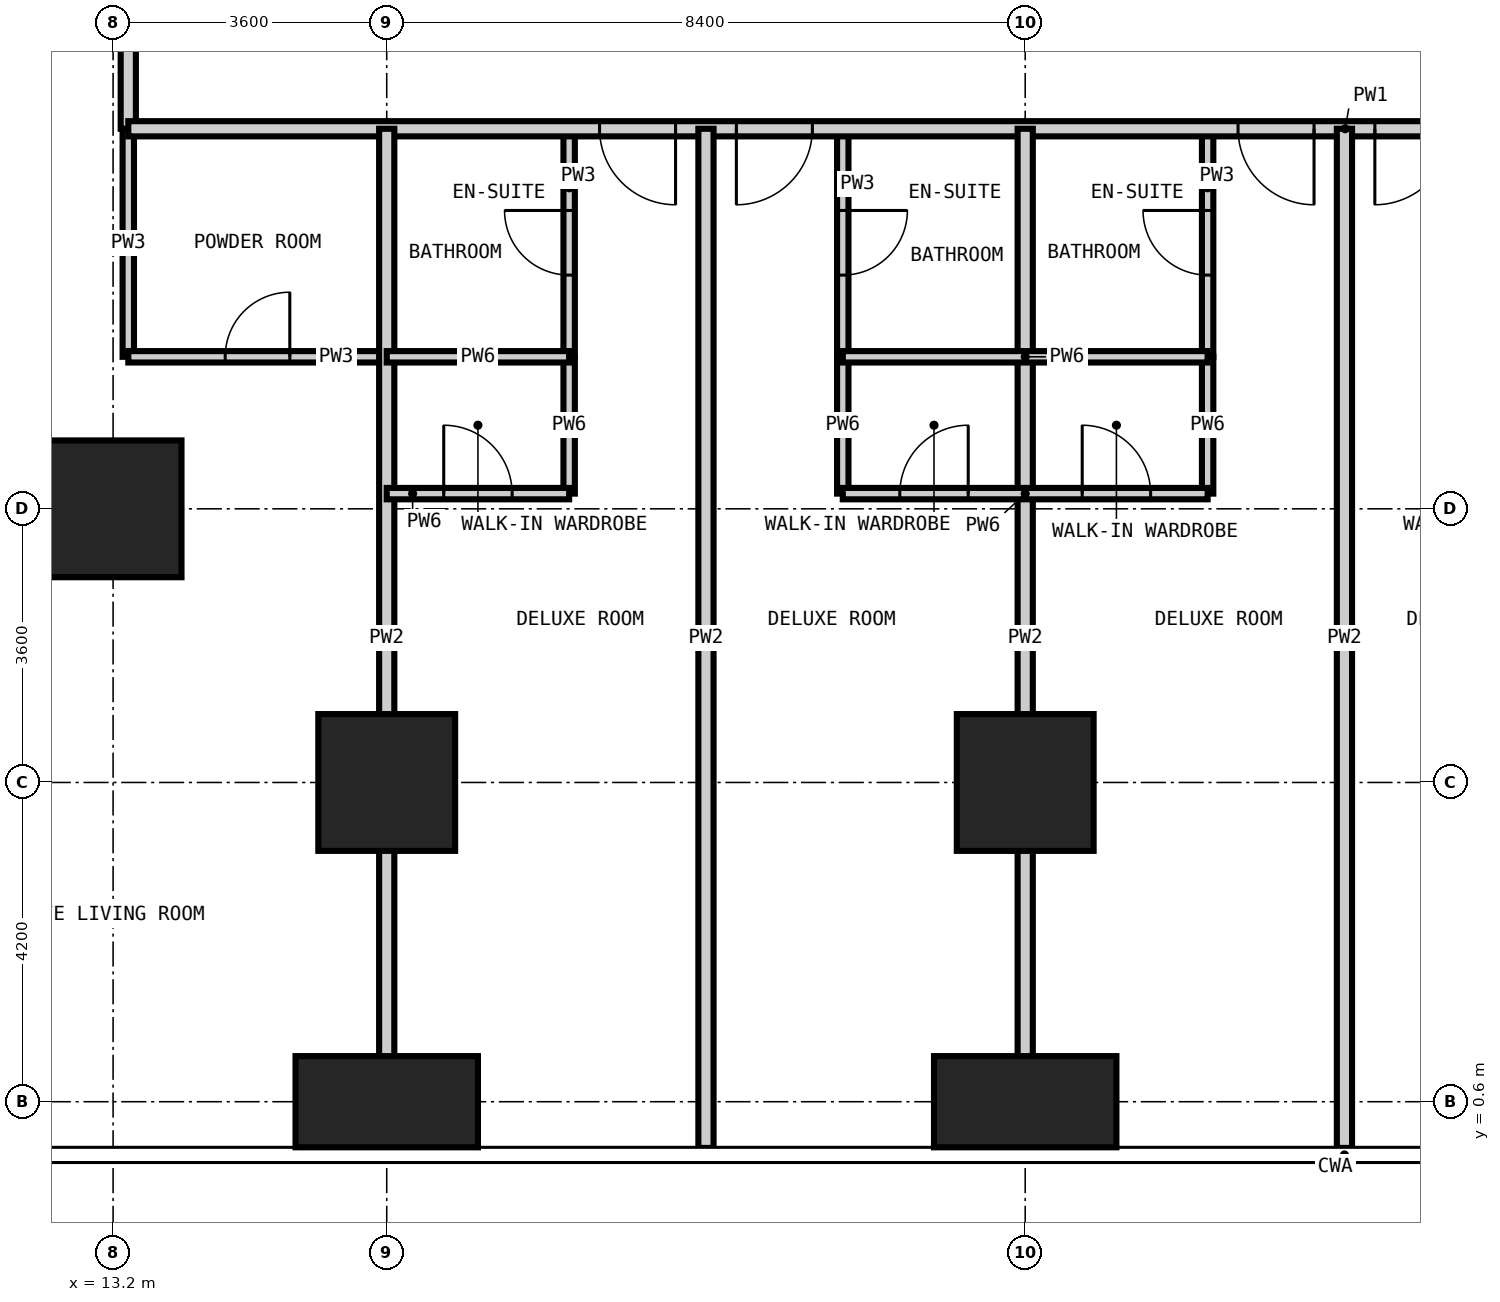
"""IFC4 building model, lengths in metres.
Left out: names, types, materials, properties, quantities, classifications, styles, units other than length and angle.
Written with IfcOpenShell. Run it as: python <this file> out.ifc"""

import sys

from ifc_helpers import new_model, si_unit, direction, frame, frame_2d, origin, origin_2d, place, context, subcontext, project, spatial, rectangle, extrude, element, fill, save


model = new_model("IFC4")
c1 = context("Model", 3, precision=1e-05, world=origin(), true_north=direction((0.0, 1.0)))
c2 = subcontext(c1, "Body", "Model", "MODEL_VIEW")
j1 = project(units=[si_unit("LENGTHUNIT", "METRE"), si_unit("PLANEANGLEUNIT", "RADIAN")], contexts=[c1])
p1 = place(None, origin())
s1 = spatial("IfcSite", under=j1, at=p1, CompositionType="ELEMENT")
p2 = place(p1, origin())
s2 = spatial("IfcBuilding", under=s1, at=p2, CompositionType="ELEMENT")
p3 = place(p2, frame((0.0, 0.0, 27.0)))
s3 = spatial("IfcBuildingStorey", under=s2, at=p3, CompositionType="ELEMENT", Elevation=27.0)
p4 = place(p3, frame((13.2, 8.4, -0.35), z_axis=(0.0, 0.0, 1.0), x_axis=(1.0, 0.0, 0.0)))
e1 = element("IfcColumn", 1, at=p4, inside=s3, PredefinedType="COLUMN", context=c2, shape_type="SweptSolid", body=[
    extrude(rectangle(XDim=1.8, YDim=1.8, at=origin_2d()), origin(), (0.0, 0.0, 1.0), 3.6),
])
p5 = place(p3, frame((16.8, 0.6, -0.35), z_axis=(0.0, 0.0, 1.0), x_axis=(1.0, 0.0, 0.0)))
e2 = element("IfcColumn", 2, at=p5, inside=s3, PredefinedType="COLUMN", context=c2, shape_type="SweptSolid", body=[
    extrude(rectangle(XDim=2.4, YDim=1.2, at=origin_2d()), origin(), (0.0, 0.0, 1.0), 3.6),
])
p6 = place(p3, frame((16.8, 4.8, -0.35), z_axis=(0.0, 0.0, 1.0), x_axis=(1.0, 0.0, 0.0)))
e3 = element("IfcColumn", 3, at=p6, inside=s3, PredefinedType="COLUMN", context=c2, shape_type="SweptSolid", body=[
    extrude(rectangle(XDim=1.8, YDim=1.8, at=origin_2d()), origin(), (0.0, 0.0, 1.0), 3.6),
])
p7 = place(p3, frame((25.2, 0.6, -0.35), z_axis=(0.0, 0.0, 1.0), x_axis=(1.0, 0.0, 0.0)))
e4 = element("IfcColumn", 4, at=p7, inside=s3, PredefinedType="COLUMN", context=c2, shape_type="SweptSolid", body=[
    extrude(rectangle(XDim=2.4, YDim=1.2, at=origin_2d()), origin(), (0.0, 0.0, 1.0), 3.6),
])
p8 = place(p3, frame((25.2, 4.8, -0.35), z_axis=(0.0, 0.0, 1.0), x_axis=(1.0, 0.0, 0.0)))
e5 = element("IfcColumn", 5, at=p8, inside=s3, PredefinedType="COLUMN", context=c2, shape_type="SweptSolid", body=[
    extrude(rectangle(XDim=1.8, YDim=1.8, at=origin_2d()), origin(), (0.0, 0.0, 1.0), 3.6),
])
p9 = place(p3, frame((13.4, 10.4, 0.0), z_axis=(0.0, 0.0, 1.0), x_axis=(0.0, 1.0, 0.0)))
e6 = element("IfcWall", 6, at=p9, inside=s3, PredefinedType="PARTITIONING", context=c2, shape_type="SweptSolid", body=[
    extrude(rectangle(XDim=3.0, YDim=0.15, at=frame_2d((1.5, 0.0))), origin(), (0.0, 0.0, 1.0), 3.25),
])
p10 = place(p3, frame((19.2, 10.4, 0.0), z_axis=(0.0, 0.0, 1.0), x_axis=(0.0, 1.0, 0.0)))
e7 = element("IfcWall", 7, at=p10, inside=s3, PredefinedType="PARTITIONING", context=c2, shape_type="SweptSolid", body=[
    extrude(rectangle(XDim=3.0, YDim=0.15, at=frame_2d((1.5, 0.0))), origin(), (0.0, 0.0, 1.0), 3.25),
])
p11 = place(p10, frame((1.075, 0.0, 0.0)))
e8 = element("IfcOpeningElement", 8, at=p11, cuts=e7, PredefinedType="OPENING", context=c2, shape_type="SweptSolid", body=[
    extrude(rectangle(XDim=0.85, YDim=2.1, at=frame_2d((0.425, 1.05))), frame((0.0, 0.085, 0.0), z_axis=(0.0, -1.0, 0.0), x_axis=(1.0, 0.0, 0.0)), (0.0, 0.0, 1.0), 0.17),
])
p12 = place(p3, frame((22.8, 10.4, 0.0), z_axis=(0.0, 0.0, 1.0), x_axis=(0.0, 1.0, 0.0)))
e9 = element("IfcWall", 9, at=p12, inside=s3, PredefinedType="PARTITIONING", context=c2, shape_type="SweptSolid", body=[
    extrude(rectangle(XDim=3.0, YDim=0.15, at=frame_2d((1.5, 0.0))), origin(), (0.0, 0.0, 1.0), 3.25),
])
p13 = place(p12, frame((1.075, 0.0, 0.0)))
e10 = element("IfcOpeningElement", 10, at=p13, cuts=e9, PredefinedType="OPENING", context=c2, shape_type="SweptSolid", body=[
    extrude(rectangle(XDim=0.85, YDim=2.1, at=frame_2d((0.425, 1.05))), frame((0.0, 0.085, 0.0), z_axis=(0.0, -1.0, 0.0), x_axis=(1.0, 0.0, 0.0)), (0.0, 0.0, 1.0), 0.17),
])
p14 = place(p3, frame((27.6, 10.4, 0.0), z_axis=(0.0, 0.0, 1.0), x_axis=(0.0, 1.0, 0.0)))
e11 = element("IfcWall", 11, at=p14, inside=s3, PredefinedType="PARTITIONING", context=c2, shape_type="SweptSolid", body=[
    extrude(rectangle(XDim=3.0, YDim=0.15, at=frame_2d((1.5, 0.0))), origin(), (0.0, 0.0, 1.0), 3.25),
])
p15 = place(p14, frame((1.075, 0.0, 0.0)))
e12 = element("IfcOpeningElement", 12, at=p15, cuts=e11, PredefinedType="OPENING", context=c2, shape_type="SweptSolid", body=[
    extrude(rectangle(XDim=0.85, YDim=2.1, at=frame_2d((0.425, 1.05))), frame((0.0, 0.085, 0.0), z_axis=(0.0, -1.0, 0.0), x_axis=(1.0, 0.0, 0.0)), (0.0, 0.0, 1.0), 0.17),
])
p16 = place(p3, frame((13.4, 10.4, 0.0), z_axis=(0.0, 0.0, 1.0), x_axis=(1.0, 0.0, 0.0)))
e13 = element("IfcWall", 13, at=p16, inside=s3, PredefinedType="PARTITIONING", context=c2, shape_type="SweptSolid", body=[
    extrude(rectangle(XDim=3.4, YDim=0.15, at=frame_2d((1.7, 0.0))), origin(), (0.0, 0.0, 1.0), 3.25),
])
p17 = place(p16, frame((1.275, 0.0, 0.0)))
e14 = element("IfcOpeningElement", 14, at=p17, cuts=e13, PredefinedType="OPENING", context=c2, shape_type="SweptSolid", body=[
    extrude(rectangle(XDim=0.85, YDim=2.1, at=frame_2d((0.425, 1.05))), frame((0.0, 0.085, 0.0), z_axis=(0.0, -1.0, 0.0), x_axis=(1.0, 0.0, 0.0)), (0.0, 0.0, 1.0), 0.17),
])
p18 = place(p3, frame((13.4, 13.4, 0.0), z_axis=(0.0, 0.0, 1.0), x_axis=(0.0, 1.0, 0.0)))
e15 = element("IfcWall", 15, at=p18, inside=s3, PredefinedType="PARTITIONING", context=c2, shape_type="SweptSolid", body=[
    extrude(rectangle(XDim=20.2, YDim=0.2, at=frame_2d((10.1, 0.0))), origin(), (0.0, 0.0, 1.0), 3.25),
])
p19 = place(p18, frame((6.2, 0.0, 0.0)))
e16 = element("IfcOpeningElement", 16, at=p19, cuts=e15, PredefinedType="OPENING", context=c2, shape_type="SweptSolid", body=[
    extrude(rectangle(XDim=1.0, YDim=2.2, at=frame_2d((0.5, 1.1))), frame((0.0, 0.11, 0.0), z_axis=(0.0, -1.0, 0.0), x_axis=(1.0, 0.0, 0.0)), (0.0, 0.0, 1.0), 0.22),
])
p20 = place(p18, frame((8.0, 0.0, 0.0)))
e17 = element("IfcOpeningElement", 17, at=p20, cuts=e15, PredefinedType="OPENING", context=c2, shape_type="SweptSolid", body=[
    extrude(rectangle(XDim=1.0, YDim=2.2, at=frame_2d((0.5, 1.1))), frame((0.0, 0.11, 0.0), z_axis=(0.0, -1.0, 0.0), x_axis=(1.0, 0.0, 0.0)), (0.0, 0.0, 1.0), 0.22),
])
p21 = place(p18, frame((14.6, 0.0, 0.0)))
e18 = element("IfcOpeningElement", 18, at=p21, cuts=e15, PredefinedType="OPENING", context=c2, shape_type="SweptSolid", body=[
    extrude(rectangle(XDim=1.0, YDim=2.2, at=frame_2d((0.5, 1.1))), frame((0.0, 0.11, 0.0), z_axis=(0.0, -1.0, 0.0), x_axis=(1.0, 0.0, 0.0)), (0.0, 0.0, 1.0), 0.22),
])
p22 = place(p18, frame((16.4, 0.0, 0.0)))
e19 = element("IfcOpeningElement", 19, at=p22, cuts=e15, PredefinedType="OPENING", context=c2, shape_type="SweptSolid", body=[
    extrude(rectangle(XDim=1.0, YDim=2.2, at=frame_2d((0.5, 1.1))), frame((0.0, 0.11, 0.0), z_axis=(0.0, -1.0, 0.0), x_axis=(1.0, 0.0, 0.0)), (0.0, 0.0, 1.0), 0.22),
])
p23 = place(p18, frame((1.2, 0.0, 0.0)))
e20 = element("IfcOpeningElement", 20, at=p23, cuts=e15, PredefinedType="OPENING", context=c2, shape_type="SweptSolid", body=[
    extrude(rectangle(XDim=1.0, YDim=2.2, at=frame_2d((0.5, 1.1))), frame((0.0, 0.11, 0.0), z_axis=(0.0, -1.0, 0.0), x_axis=(1.0, 0.0, 0.0)), (0.0, 0.0, 1.0), 0.22),
])
p24 = place(p3, frame((45.7, 13.4, 0.0), z_axis=(0.0, 0.0, 1.0), x_axis=(-1.0, 0.0, 0.0)))
e21 = element("IfcWall", 21, at=p24, inside=s3, PredefinedType="PARTITIONING", context=c2, shape_type="SweptSolid", body=[
    extrude(rectangle(XDim=32.3, YDim=0.2, at=frame_2d((16.15, 0.0))), origin(), (0.0, 0.0, 1.0), 3.25),
])
p25 = place(p24, frame((25.1, 0.0, 0.0)))
e22 = element("IfcOpeningElement", 22, at=p25, cuts=e21, PredefinedType="OPENING", context=c2, shape_type="SweptSolid", body=[
    extrude(rectangle(XDim=1.0, YDim=2.2, at=frame_2d((0.5, 1.1))), frame((0.0, 0.11, 0.0), z_axis=(0.0, -1.0, 0.0), x_axis=(1.0, 0.0, 0.0)), (0.0, 0.0, 1.0), 0.22),
])
p26 = place(p24, frame((23.3, 0.0, 0.0)))
e23 = element("IfcOpeningElement", 23, at=p26, cuts=e21, PredefinedType="OPENING", context=c2, shape_type="SweptSolid", body=[
    extrude(rectangle(XDim=1.0, YDim=2.2, at=frame_2d((0.5, 1.1))), frame((0.0, 0.11, 0.0), z_axis=(0.0, -1.0, 0.0), x_axis=(1.0, 0.0, 0.0)), (0.0, 0.0, 1.0), 0.22),
])
p27 = place(p24, frame((16.7, 0.0, 0.0)))
e24 = element("IfcOpeningElement", 24, at=p27, cuts=e21, PredefinedType="OPENING", context=c2, shape_type="SweptSolid", body=[
    extrude(rectangle(XDim=1.0, YDim=2.2, at=frame_2d((0.5, 1.1))), frame((0.0, 0.11, 0.0), z_axis=(0.0, -1.0, 0.0), x_axis=(1.0, 0.0, 0.0)), (0.0, 0.0, 1.0), 0.22),
])
p28 = place(p24, frame((14.9, 0.0, 0.0)))
e25 = element("IfcOpeningElement", 25, at=p28, cuts=e21, PredefinedType="OPENING", context=c2, shape_type="SweptSolid", body=[
    extrude(rectangle(XDim=1.0, YDim=2.2, at=frame_2d((0.5, 1.1))), frame((0.0, 0.11, 0.0), z_axis=(0.0, -1.0, 0.0), x_axis=(1.0, 0.0, 0.0)), (0.0, 0.0, 1.0), 0.22),
])
p29 = place(p24, frame((8.3, 0.0, 0.0)))
e26 = element("IfcOpeningElement", 26, at=p29, cuts=e21, PredefinedType="OPENING", context=c2, shape_type="SweptSolid", body=[
    extrude(rectangle(XDim=1.0, YDim=2.2, at=frame_2d((0.5, 1.1))), frame((0.0, 0.11, 0.0), z_axis=(0.0, -1.0, 0.0), x_axis=(1.0, 0.0, 0.0)), (0.0, 0.0, 1.0), 0.22),
])
p30 = place(p24, frame((6.5, 0.0, 0.0)))
e27 = element("IfcOpeningElement", 27, at=p30, cuts=e21, PredefinedType="OPENING", context=c2, shape_type="SweptSolid", body=[
    extrude(rectangle(XDim=1.0, YDim=2.2, at=frame_2d((0.5, 1.1))), frame((0.0, 0.11, 0.0), z_axis=(0.0, -1.0, 0.0), x_axis=(1.0, 0.0, 0.0)), (0.0, 0.0, 1.0), 0.22),
])
for number, where, z_axis, x_axis in (
    (28, (16.8, -0.008, 0.0), (0.0, 0.0, 1.0), (0.0, 1.0, 0.0)),
    (29, (21.0, -0.008, 0.0), (0.0, 0.0, 1.0), (0.0, 1.0, 0.0)),
    (30, (25.2, -0.008, 0.0), (0.0, 0.0, 1.0), (0.0, 1.0, 0.0)),
    (31, (29.4, -0.008, 0.0), (0.0, 0.0, 1.0), (0.0, 1.0, 0.0)),
):
    element("IfcWall", number, at=place(p3, frame(where, z_axis=z_axis, x_axis=x_axis)), inside=s3, PredefinedType="PARTITIONING", context=c2, shape_type="SweptSolid", body=[
        extrude(rectangle(XDim=13.408, YDim=0.2, at=frame_2d((6.704, 0.0))), origin(), (0.0, 0.0, 1.0), 3.25),
    ])
for number, where, z_axis, x_axis in (
    (32, (19.2, 8.6, 0.0), (0.0, 0.0, 1.0), (0.0, 1.0, 0.0)),
    (33, (22.8, 8.6, 0.0), (0.0, 0.0, 1.0), (0.0, 1.0, 0.0)),
    (34, (27.6, 8.6, 0.0), (0.0, 0.0, 1.0), (0.0, 1.0, 0.0)),
):
    element("IfcWall", number, at=place(p3, frame(where, z_axis=z_axis, x_axis=x_axis)), inside=s3, PredefinedType="PARTITIONING", context=c2, shape_type="SweptSolid", body=[
        extrude(rectangle(XDim=1.8, YDim=0.15, at=frame_2d((0.9, 0.0))), origin(), (0.0, 0.0, 1.0), 3.25),
    ])
p31 = place(p3, frame((16.8, 8.6, 0.0), z_axis=(0.0, 0.0, 1.0), x_axis=(1.0, 0.0, 0.0)))
e35 = element("IfcWall", 35, at=p31, inside=s3, PredefinedType="PARTITIONING", context=c2, shape_type="SweptSolid", body=[
    extrude(rectangle(XDim=2.4, YDim=0.15, at=frame_2d((1.2, 0.0))), origin(), (0.0, 0.0, 1.0), 3.25),
])
p32 = place(p31, frame((0.75, 0.0, 0.0)))
e36 = element("IfcOpeningElement", 36, at=p32, cuts=e35, PredefinedType="OPENING", context=c2, shape_type="SweptSolid", body=[
    extrude(rectangle(XDim=0.9, YDim=2.1, at=frame_2d((0.45, 1.05))), frame((0.0, 0.085, 0.0), z_axis=(0.0, -1.0, 0.0), x_axis=(1.0, 0.0, 0.0)), (0.0, 0.0, 1.0), 0.17),
])
p33 = place(p3, frame((22.8, 8.6, 0.0), z_axis=(0.0, 0.0, 1.0), x_axis=(1.0, 0.0, 0.0)))
e37 = element("IfcWall", 37, at=p33, inside=s3, PredefinedType="PARTITIONING", context=c2, shape_type="SweptSolid", body=[
    extrude(rectangle(XDim=4.8, YDim=0.15, at=frame_2d((2.4, 0.0))), origin(), (0.0, 0.0, 1.0), 3.25),
])
p34 = place(p33, frame((0.75, 0.0, 0.0)))
e38 = element("IfcOpeningElement", 38, at=p34, cuts=e37, PredefinedType="OPENING", context=c2, shape_type="SweptSolid", body=[
    extrude(rectangle(XDim=0.9, YDim=2.1, at=frame_2d((0.45, 1.05))), frame((0.0, 0.085, 0.0), z_axis=(0.0, -1.0, 0.0), x_axis=(1.0, 0.0, 0.0)), (0.0, 0.0, 1.0), 0.17),
])
p35 = place(p33, frame((3.15, 0.0, 0.0)))
e39 = element("IfcOpeningElement", 39, at=p35, cuts=e37, PredefinedType="OPENING", context=c2, shape_type="SweptSolid", body=[
    extrude(rectangle(XDim=0.9, YDim=2.1, at=frame_2d((0.45, 1.05))), frame((0.0, 0.085, 0.0), z_axis=(0.0, -1.0, 0.0), x_axis=(1.0, 0.0, 0.0)), (0.0, 0.0, 1.0), 0.17),
])
p36 = place(p3, frame((16.8, 10.4, 0.0), z_axis=(0.0, 0.0, 1.0), x_axis=(1.0, 0.0, 0.0)))
e40 = element("IfcWall", 40, at=p36, inside=s3, PredefinedType="PARTITIONING", context=c2, shape_type="SweptSolid", body=[
    extrude(rectangle(XDim=2.4, YDim=0.15, at=frame_2d((1.2, 0.0))), origin(), (0.0, 0.0, 1.0), 3.25),
])
p37 = place(p3, frame((22.8, 10.4, 0.0), z_axis=(0.0, 0.0, 1.0), x_axis=(1.0, 0.0, 0.0)))
e41 = element("IfcWall", 41, at=p37, inside=s3, PredefinedType="PARTITIONING", context=c2, shape_type="SweptSolid", body=[
    extrude(rectangle(XDim=4.8, YDim=0.15, at=frame_2d((2.4, 0.0))), origin(), (0.0, 0.0, 1.0), 3.25),
])
p38 = place(p25, origin())
e42 = element("IfcDoor", 42, at=p38, inside=s3, OperationType="SINGLE_SWING_LEFT", PredefinedType="DOOR", context=c2, shape_type="SweptSolid", body=[
    extrude(rectangle(XDim=1.0, YDim=2.2, at=frame_2d((0.5, 1.1))), frame((0.0, 0.025, 0.0), z_axis=(0.0, -1.0, 0.0), x_axis=(1.0, 0.0, 0.0)), (0.0, 0.0, 1.0), 0.05),
])
fill(e22, e42)
p39 = place(p11, origin())
e43 = element("IfcDoor", 43, at=p39, inside=s3, OperationType="SINGLE_SWING_RIGHT", PredefinedType="DOOR", context=c2, shape_type="SweptSolid", body=[
    extrude(rectangle(XDim=0.85, YDim=2.1, at=frame_2d((0.425, 1.05))), frame((0.0, 0.025, 0.0), z_axis=(0.0, -1.0, 0.0), x_axis=(1.0, 0.0, 0.0)), (0.0, 0.0, 1.0), 0.05),
])
fill(e8, e43)
p40 = place(p32, origin())
e44 = element("IfcDoor", 44, at=p40, inside=s3, OperationType="SINGLE_SWING_LEFT", PredefinedType="DOOR", context=c2, shape_type="SweptSolid", body=[
    extrude(rectangle(XDim=0.9, YDim=2.1, at=frame_2d((0.45, 1.05))), frame((0.0, 0.025, 0.0), z_axis=(0.0, -1.0, 0.0), x_axis=(1.0, 0.0, 0.0)), (0.0, 0.0, 1.0), 0.05),
])
fill(e36, e44)
p41 = place(p26, origin())
e45 = element("IfcDoor", 45, at=p41, inside=s3, OperationType="SINGLE_SWING_RIGHT", PredefinedType="DOOR", context=c2, shape_type="SweptSolid", body=[
    extrude(rectangle(XDim=1.0, YDim=2.2, at=frame_2d((0.5, 1.1))), frame((0.0, 0.025, 0.0), z_axis=(0.0, -1.0, 0.0), x_axis=(1.0, 0.0, 0.0)), (0.0, 0.0, 1.0), 0.05),
])
fill(e23, e45)
p42 = place(p13, frame((0.85, 0.0, 0.0), z_axis=(0.0, 0.0, 1.0), x_axis=(-1.0, 0.0, 0.0)))
e46 = element("IfcDoor", 46, at=p42, inside=s3, OperationType="SINGLE_SWING_LEFT", PredefinedType="DOOR", context=c2, shape_type="SweptSolid", body=[
    extrude(rectangle(XDim=0.85, YDim=2.1, at=frame_2d((0.425, 1.05))), frame((0.0, 0.025, 0.0), z_axis=(0.0, -1.0, 0.0), x_axis=(1.0, 0.0, 0.0)), (0.0, 0.0, 1.0), 0.05),
])
fill(e10, e46)
p43 = place(p34, origin())
e47 = element("IfcDoor", 47, at=p43, inside=s3, OperationType="SINGLE_SWING_RIGHT", PredefinedType="DOOR", context=c2, shape_type="SweptSolid", body=[
    extrude(rectangle(XDim=0.9, YDim=2.1, at=frame_2d((0.45, 1.05))), frame((0.0, 0.025, 0.0), z_axis=(0.0, -1.0, 0.0), x_axis=(1.0, 0.0, 0.0)), (0.0, 0.0, 1.0), 0.05),
])
fill(e38, e47)
p44 = place(p27, origin())
e48 = element("IfcDoor", 48, at=p44, inside=s3, OperationType="SINGLE_SWING_LEFT", PredefinedType="DOOR", context=c2, shape_type="SweptSolid", body=[
    extrude(rectangle(XDim=1.0, YDim=2.2, at=frame_2d((0.5, 1.1))), frame((0.0, 0.025, 0.0), z_axis=(0.0, -1.0, 0.0), x_axis=(1.0, 0.0, 0.0)), (0.0, 0.0, 1.0), 0.05),
])
fill(e24, e48)
p45 = place(p15, origin())
e49 = element("IfcDoor", 49, at=p45, inside=s3, OperationType="SINGLE_SWING_RIGHT", PredefinedType="DOOR", context=c2, shape_type="SweptSolid", body=[
    extrude(rectangle(XDim=0.85, YDim=2.1, at=frame_2d((0.425, 1.05))), frame((0.0, 0.025, 0.0), z_axis=(0.0, -1.0, 0.0), x_axis=(1.0, 0.0, 0.0)), (0.0, 0.0, 1.0), 0.05),
])
fill(e12, e49)
p46 = place(p35, origin())
e50 = element("IfcDoor", 50, at=p46, inside=s3, OperationType="SINGLE_SWING_LEFT", PredefinedType="DOOR", context=c2, shape_type="SweptSolid", body=[
    extrude(rectangle(XDim=0.9, YDim=2.1, at=frame_2d((0.45, 1.05))), frame((0.0, 0.025, 0.0), z_axis=(0.0, -1.0, 0.0), x_axis=(1.0, 0.0, 0.0)), (0.0, 0.0, 1.0), 0.05),
])
fill(e39, e50)
p47 = place(p28, origin())
e51 = element("IfcDoor", 51, at=p47, inside=s3, OperationType="SINGLE_SWING_RIGHT", PredefinedType="DOOR", context=c2, shape_type="SweptSolid", body=[
    extrude(rectangle(XDim=1.0, YDim=2.2, at=frame_2d((0.5, 1.1))), frame((0.0, 0.025, 0.0), z_axis=(0.0, -1.0, 0.0), x_axis=(1.0, 0.0, 0.0)), (0.0, 0.0, 1.0), 0.05),
])
fill(e25, e51)
p48 = place(p17, origin())
e52 = element("IfcDoor", 52, at=p48, inside=s3, OperationType="SINGLE_SWING_RIGHT", PredefinedType="DOOR", context=c2, shape_type="SweptSolid", body=[
    extrude(rectangle(XDim=0.85, YDim=2.1, at=frame_2d((0.425, 1.05))), frame((0.0, 0.025, 0.0), z_axis=(0.0, -1.0, 0.0), x_axis=(1.0, 0.0, 0.0)), (0.0, 0.0, 1.0), 0.05),
])
fill(e14, e52)
save(model, sys.argv[1])
